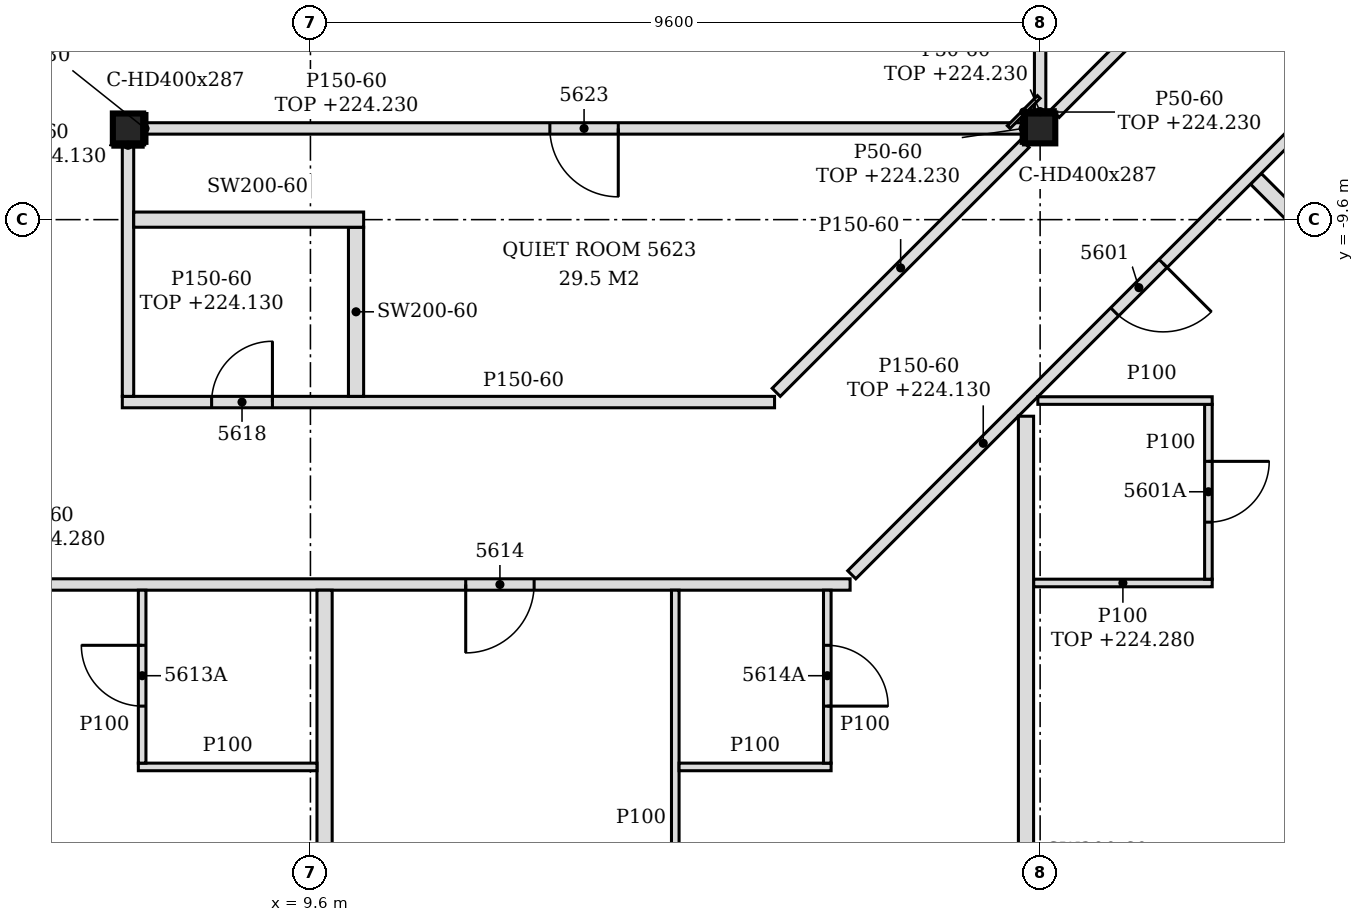
"""IFC4 building model, lengths in metres.
Left out: names, types, materials, properties, quantities, classifications, styles, units other than length and angle.
Written with IfcOpenShell. Run it as: python <this file> out.ifc"""

import sys

from ifc_helpers import new_model, si_unit, direction, frame, frame_2d, origin, origin_2d, place, context, subcontext, project, spatial, polyline, rectangle, i_section, outline, extrude, element, fill, save


model = new_model("IFC4")
c1 = context("Model", 3, precision=1e-05, world=origin(), true_north=direction((0.0, 1.0)))
c2 = subcontext(c1, "Body", "Model", "MODEL_VIEW")
j1 = project(units=[si_unit("LENGTHUNIT", "METRE"), si_unit("PLANEANGLEUNIT", "RADIAN")], contexts=[c1])
p1 = place(None, origin())
s1 = spatial("IfcSite", under=j1, at=p1, CompositionType="ELEMENT")
p2 = place(p1, origin())
s2 = spatial("IfcBuilding", under=s1, at=p2, CompositionType="ELEMENT")
p3 = place(p2, frame((0.0, 0.0, 221.4)))
s3 = spatial("IfcBuildingStorey", under=s2, at=p3, CompositionType="ELEMENT", Elevation=221.4)
for number, where, z_axis, x_axis in (
    (1, (7.2, -8.4, -0.15), (0.0, 0.0, 1.0), (1.0, 0.0, 0.0)),
    (2, (19.2, -8.4, -0.15), (0.0, 0.0, 1.0), (1.0, 0.0, 0.0)),
):
    element("IfcColumn", number, at=place(p3, frame(where, z_axis=z_axis, x_axis=x_axis)), inside=s3, PredefinedType="COLUMN", context=c2, shape_type="SweptSolid", body=[
        extrude(i_section(OverallWidth=0.399, OverallDepth=0.393, WebThickness=0.023, FlangeThickness=0.037, FilletRadius=0.015, at=origin_2d()), origin(), (0.0, 0.0, 1.0), 3.6),
    ])
p4 = place(p3, frame((9.786, -23.62, 0.0), z_axis=(0.0, 0.0, 1.0), x_axis=(0.0, 1.0, 0.0)))
e3 = element("IfcWall", 3, at=p4, inside=s3, PredefinedType="PARTITIONING", context=c2, shape_type="SweptSolid", body=[
    extrude(outline(polyline([(0.0, 0.0), (9.145, 0.0), (9.145, 2.88), (9.115, 2.88), (9.113, 3.45), (4.525, 3.45), (4.523, 2.88), (4.315, 2.88), (4.313, 3.45), (0.67, 3.45), (0.668, 2.93), (0.37, 2.93), (0.368, 3.45), (0.0, 3.45), (0.0, 0.0)])), frame((0.0, 0.1, 0.0), z_axis=(0.0, -1.0, 0.0), x_axis=(1.0, 0.0, 0.0)), (0.0, 0.0, 1.0), 0.2),
])
p5 = place(p3, frame((19.014, -23.62, 0.0), z_axis=(0.0, 0.0, 1.0), x_axis=(0.0, 1.0, 0.0)))
e4 = element("IfcWall", 4, at=p5, inside=s3, PredefinedType="PARTITIONING", context=c2, shape_type="SweptSolid", body=[
    extrude(outline(polyline([(0.0, 0.0), (11.434, 0.0), (11.434, 2.73), (0.64, 2.73), (0.638, 2.93), (0.37, 2.93), (0.368, 3.45), (0.0, 3.45), (0.0, 0.0)])), frame((0.0, 0.1, 0.0), z_axis=(0.0, -1.0, 0.0), x_axis=(1.0, 0.0, 0.0)), (0.0, 0.0, 1.0), 0.2),
])
p6 = place(p3, frame((14.4, -22.877, 0.0), z_axis=(0.0, 0.0, 1.0), x_axis=(0.0, 1.0, 0.0)))
e5 = element("IfcWall", 5, at=p6, inside=s3, PredefinedType="PARTITIONING", context=c2, shape_type="SweptSolid", body=[
    extrude(outline(polyline([(0.0, 0.0), (8.402, 0.0), (8.402, 2.88), (8.372, 2.88), (8.37, 3.45), (3.782, 3.45), (3.78, 2.88), (3.572, 2.88), (3.57, 3.45), (0.0, 3.45), (0.0, 0.0)])), frame((0.0, 0.05, 0.0), z_axis=(0.0, -1.0, 0.0), x_axis=(1.0, 0.0, 0.0)), (0.0, 0.0, 1.0), 0.1),
])
p7 = place(p6, frame((2.027, 0.0, 0.0)))
e6 = element("IfcOpeningElement", 6, at=p7, cuts=e5, PredefinedType="OPENING", context=c2, shape_type="SweptSolid", body=[
    extrude(rectangle(XDim=0.9, YDim=2.1, at=frame_2d((0.45, 1.05))), frame((0.0, 0.06, 0.0), z_axis=(0.0, -1.0, 0.0), x_axis=(1.0, 0.0, 0.0)), (0.0, 0.0, 1.0), 0.12),
])
p8 = place(p3, frame((7.336, -16.8, 0.0), z_axis=(0.0, 0.0, 1.0), x_axis=(1.0, 0.0, 0.0)))
e7 = element("IfcWall", 7, at=p8, inside=s3, PredefinedType="PARTITIONING", context=c2, shape_type="SweptSolid", body=[
    extrude(outline(polyline([(0.0, 0.0), (2.35, 0.0), (2.35, 3.45), (0.014, 3.45), (0.012, 2.73), (0.0, 2.73), (0.0, 0.0)])), frame((0.0, 0.05, 0.0), z_axis=(0.0, -1.0, 0.0), x_axis=(1.0, 0.0, 0.0)), (0.0, 0.0, 1.0), 0.1),
])
p9 = place(p3, frame((7.386, -16.75, 0.0), z_axis=(0.0, 0.0, 1.0), x_axis=(0.0, 1.0, 0.0)))
e8 = element("IfcWall", 8, at=p9, inside=s3, PredefinedType="PARTITIONING", context=c2, shape_type="SweptSolid", body=[
    extrude(outline(polyline([(0.0, 0.0), (2.275, 0.0), (2.275, 2.88), (2.245, 2.88), (2.243, 3.45), (0.0, 3.45), (0.0, 0.0)])), frame((0.0, 0.05, 0.0), z_axis=(0.0, -1.0, 0.0), x_axis=(1.0, 0.0, 0.0)), (0.0, 0.0, 1.0), 0.1),
])
p10 = place(p9, frame((0.75, 0.0, 0.0)))
e9 = element("IfcOpeningElement", 9, at=p10, cuts=e8, PredefinedType="OPENING", context=c2, shape_type="SweptSolid", body=[
    extrude(rectangle(XDim=0.8, YDim=2.1, at=frame_2d((0.4, 1.05))), frame((0.0, 0.06, 0.0), z_axis=(0.0, -1.0, 0.0), x_axis=(1.0, 0.0, 0.0)), (0.0, 0.0, 1.0), 0.12),
])
p11 = place(p3, frame((14.45, -16.8, 0.0), z_axis=(0.0, 0.0, 1.0), x_axis=(1.0, 0.0, 0.0)))
e10 = element("IfcWall", 10, at=p11, inside=s3, PredefinedType="PARTITIONING", context=c2, shape_type="SweptSolid", body=[
    extrude(rectangle(XDim=2.0, YDim=0.1, at=frame_2d((1.0, 0.0))), origin(), (0.0, 0.0, 1.0), 3.45),
])
p12 = place(p3, frame((16.4, -16.75, 0.0), z_axis=(0.0, 0.0, 1.0), x_axis=(0.0, 1.0, 0.0)))
e11 = element("IfcWall", 11, at=p12, inside=s3, PredefinedType="PARTITIONING", context=c2, shape_type="SweptSolid", body=[
    extrude(outline(polyline([(0.0, 0.0), (2.275, 0.0), (2.275, 2.88), (2.245, 2.88), (2.243, 3.45), (0.0, 3.45), (0.0, 0.0)])), frame((0.0, 0.05, 0.0), z_axis=(0.0, -1.0, 0.0), x_axis=(1.0, 0.0, 0.0)), (0.0, 0.0, 1.0), 0.1),
])
p13 = place(p12, frame((0.75, 0.0, 0.0)))
e12 = element("IfcOpeningElement", 12, at=p13, cuts=e11, PredefinedType="OPENING", context=c2, shape_type="SweptSolid", body=[
    extrude(rectangle(XDim=0.8, YDim=2.1, at=frame_2d((0.4, 1.05))), frame((0.0, 0.06, 0.0), z_axis=(0.0, -1.0, 0.0), x_axis=(1.0, 0.0, 0.0)), (0.0, 0.0, 1.0), 0.12),
])
p14 = place(p3, frame((29.636, -16.66, 0.0), z_axis=(0.0, 0.0, 1.0), x_axis=(-0.707095420673, 0.707118141518, 0.0)))
e13 = element("IfcWall", 13, at=p14, inside=s3, PredefinedType="PARTITIONING", context=c2, shape_type="SweptSolid", body=[
    extrude(rectangle(XDim=10.745, YDim=0.2, at=frame_2d((5.373, 0.0))), origin(), (0.0, 0.0, 1.0), 2.88),
])
p15 = place(p3, frame((-4.326, -14.4, 0.0), z_axis=(0.0, 0.0, 1.0), x_axis=(1.0, 0.0, 0.0)))
e14 = element("IfcWall", 14, at=p15, inside=s3, PredefinedType="PARTITIONING", context=c2, shape_type="SweptSolid", body=[
    extrude(outline(polyline([(0.0, 0.0), (21.026, 0.0), (21.026, 2.88), (11.676, 2.88), (11.674, 2.73), (11.376, 2.73), (11.374, 2.88), (1.369, 2.88), (1.367, 2.63), (0.229, 2.63), (0.227, 2.88), (0.0, 2.88), (0.0, 0.0)])), frame((0.0, 0.075, 0.0), z_axis=(0.0, -1.0, 0.0), x_axis=(1.0, 0.0, 0.0)), (0.0, 0.0, 1.0), 0.15),
])
p16 = place(p15, frame((5.169, 0.0, 0.0)))
e15 = element("IfcOpeningElement", 15, at=p16, cuts=e14, PredefinedType="OPENING", context=c2, shape_type="SweptSolid", body=[
    extrude(rectangle(XDim=0.9, YDim=2.1, at=frame_2d((0.45, 1.05))), frame((0.0, 0.085, 0.0), z_axis=(0.0, -1.0, 0.0), x_axis=(1.0, 0.0, 0.0)), (0.0, 0.0, 1.0), 0.17),
])
p17 = place(p15, frame((15.969, 0.0, 0.0)))
e16 = element("IfcOpeningElement", 16, at=p17, cuts=e14, PredefinedType="OPENING", context=c2, shape_type="SweptSolid", body=[
    extrude(rectangle(XDim=0.9, YDim=2.1, at=frame_2d((0.45, 1.05))), frame((0.0, 0.085, 0.0), z_axis=(0.0, -1.0, 0.0), x_axis=(1.0, 0.0, 0.0)), (0.0, 0.0, 1.0), 0.17),
])
p18 = place(p3, frame((19.114, -14.38, 0.0), z_axis=(0.0, 0.0, 1.0), x_axis=(1.0, 0.0, 0.0)))
e17 = element("IfcWall", 17, at=p18, inside=s3, PredefinedType="PARTITIONING", context=c2, shape_type="SweptSolid", body=[
    extrude(outline(polyline([(0.0, 0.0), (2.35, 0.0), (2.35, 2.88), (0.236, 2.88), (0.234, 2.73), (0.0, 2.73), (0.0, 0.0)])), frame((0.0, 0.05, 0.0), z_axis=(0.0, -1.0, 0.0), x_axis=(1.0, 0.0, 0.0)), (0.0, 0.0, 1.0), 0.1),
])
p19 = place(p3, frame((16.722, -14.272, 0.0), z_axis=(0.0, 0.0, 1.0), x_axis=(0.707106781187, 0.707106781187, 0.0)))
e18 = element("IfcWall", 18, at=p19, inside=s3, PredefinedType="PARTITIONING", context=c2, shape_type="SweptSolid", body=[
    extrude(rectangle(XDim=20.049, YDim=0.15, at=frame_2d((10.025, 0.0))), origin(), (0.0, 0.0, 1.0), 2.73),
])
p20 = place(p19, frame((4.892, 0.0, 0.0)))
e19 = element("IfcOpeningElement", 19, at=p20, cuts=e18, PredefinedType="OPENING", context=c2, shape_type="SweptSolid", body=[
    extrude(rectangle(XDim=0.9, YDim=2.1, at=frame_2d((0.45, 1.05))), frame((0.0, 0.085, 0.0), z_axis=(0.0, -1.0, 0.0), x_axis=(1.0, 0.0, 0.0)), (0.0, 0.0, 1.0), 0.17),
])
p21 = place(p19, frame((10.042, 0.0, 0.0)))
e20 = element("IfcOpeningElement", 20, at=p21, cuts=e18, PredefinedType="OPENING", context=c2, shape_type="SweptSolid", body=[
    extrude(rectangle(XDim=0.9, YDim=2.1, at=frame_2d((0.45, 1.05))), frame((0.0, 0.085, 0.0), z_axis=(0.0, -1.0, 0.0), x_axis=(1.0, 0.0, 0.0)), (0.0, 0.0, 1.0), 0.17),
])
p22 = place(p19, frame((14.443, 0.0, 0.0)))
e21 = element("IfcOpeningElement", 21, at=p22, cuts=e18, PredefinedType="OPENING", context=c2, shape_type="SweptSolid", body=[
    extrude(rectangle(XDim=0.9, YDim=2.1, at=frame_2d((0.45, 1.05))), frame((0.0, 0.085, 0.0), z_axis=(0.0, -1.0, 0.0), x_axis=(1.0, 0.0, 0.0)), (0.0, 0.0, 1.0), 0.17),
])
p23 = place(p19, frame((17.837, 0.0, 0.0)))
e22 = element("IfcOpeningElement", 22, at=p23, cuts=e18, PredefinedType="OPENING", context=c2, shape_type="SweptSolid", body=[
    extrude(rectangle(XDim=0.9, YDim=2.1, at=frame_2d((0.45, 1.05))), frame((0.0, 0.085, 0.0), z_axis=(0.0, -1.0, 0.0), x_axis=(1.0, 0.0, 0.0)), (0.0, 0.0, 1.0), 0.17),
])
p24 = place(p3, frame((21.414, -14.33, 0.0), z_axis=(0.0, 0.0, 1.0), x_axis=(0.0, 1.0, 0.0)))
e23 = element("IfcWall", 23, at=p24, inside=s3, PredefinedType="PARTITIONING", context=c2, shape_type="SweptSolid", body=[
    extrude(outline(polyline([(0.0, 0.0), (2.3, 0.0), (2.3, 3.45), (0.035, 3.45), (0.033, 2.88), (0.0, 2.88), (0.0, 0.0)])), frame((0.0, 0.05, 0.0), z_axis=(0.0, -1.0, 0.0), x_axis=(1.0, 0.0, 0.0)), (0.0, 0.0, 1.0), 0.1),
])
p25 = place(p24, frame((0.75, 0.0, 0.0)))
e24 = element("IfcOpeningElement", 24, at=p25, cuts=e23, PredefinedType="OPENING", context=c2, shape_type="SweptSolid", body=[
    extrude(rectangle(XDim=0.8, YDim=2.1, at=frame_2d((0.4, 1.05))), frame((0.0, 0.06, 0.0), z_axis=(0.0, -1.0, 0.0), x_axis=(1.0, 0.0, 0.0)), (0.0, 0.0, 1.0), 0.12),
])
p26 = place(p3, frame((7.125, -12.0, 0.0), z_axis=(0.0, 0.0, 1.0), x_axis=(1.0, 0.0, 0.0)))
e25 = element("IfcWall", 25, at=p26, inside=s3, PredefinedType="PARTITIONING", context=c2, shape_type="SweptSolid", body=[
    extrude(outline(polyline([(0.0, 0.0), (8.581, 0.0), (8.581, 3.45), (0.225, 3.45), (0.223, 2.73), (0.0, 2.73), (0.0, 0.0)])), frame((0.0, 0.075, 0.0), z_axis=(0.0, -1.0, 0.0), x_axis=(1.0, 0.0, 0.0)), (0.0, 0.0, 1.0), 0.15),
])
p27 = place(p26, frame((1.175, 0.0, 0.0)))
e26 = element("IfcOpeningElement", 26, at=p27, cuts=e25, PredefinedType="OPENING", context=c2, shape_type="SweptSolid", body=[
    extrude(rectangle(XDim=0.8, YDim=2.1, at=frame_2d((0.4, 1.05))), frame((0.0, 0.085, 0.0), z_axis=(0.0, -1.0, 0.0), x_axis=(1.0, 0.0, 0.0)), (0.0, 0.0, 1.0), 0.17),
])
p28 = place(p3, frame((19.17, -11.98, 0.0), z_axis=(0.0, 0.0, 1.0), x_axis=(1.0, 0.0, 0.0)))
e27 = element("IfcWall", 27, at=p28, inside=s3, PredefinedType="PARTITIONING", context=c2, shape_type="SweptSolid", body=[
    extrude(outline(polyline([(0.0, 0.0), (2.294, 0.0), (2.294, 3.45), (0.18, 3.45), (0.178, 2.73), (0.0, 2.73), (0.0, 0.0)])), frame((0.0, 0.05, 0.0), z_axis=(0.0, -1.0, 0.0), x_axis=(1.0, 0.0, 0.0)), (0.0, 0.0, 1.0), 0.1),
])
p29 = place(p3, frame((7.2, -11.925, 0.0), z_axis=(0.0, 0.0, 1.0), x_axis=(0.0, 1.0, 0.0)))
e28 = element("IfcWall", 28, at=p29, inside=s3, PredefinedType="PARTITIONING", context=c2, shape_type="SweptSolid", body=[
    extrude(rectangle(XDim=3.329, YDim=0.15, at=frame_2d((1.664, 0.0))), origin(), (0.0, 0.0, 1.0), 2.73),
])
p30 = place(p3, frame((10.2, -11.925, 0.0), z_axis=(0.0, 0.0, 1.0), x_axis=(0.0, 1.0, 0.0)))
e29 = element("IfcWall", 29, at=p30, inside=s3, PredefinedType="PARTITIONING", context=c2, shape_type="SweptSolid", body=[
    extrude(rectangle(XDim=2.225, YDim=0.2, at=frame_2d((1.113, 0.0))), origin(), (0.0, 0.0, 1.0), 3.45),
])
p31 = place(p3, frame((15.728, -11.872, 0.0), z_axis=(0.0, 0.0, 1.0), x_axis=(0.707080416772, 0.707133144618, 0.0)))
e30 = element("IfcWall", 30, at=p31, inside=s3, PredefinedType="PARTITIONING", context=c2, shape_type="SweptSolid", body=[
    extrude(rectangle(XDim=4.63, YDim=0.15, at=frame_2d((2.315, 0.0))), origin(), (0.0, 0.0, 1.0), 3.45),
])
p32 = place(p3, frame((7.275, -9.6, 0.0), z_axis=(0.0, 0.0, 1.0), x_axis=(1.0, 0.0, 0.0)))
e31 = element("IfcWall", 31, at=p32, inside=s3, PredefinedType="PARTITIONING", context=c2, shape_type="SweptSolid", body=[
    extrude(outline(polyline([(0.0, 0.0), (3.025, 0.0), (3.025, 3.45), (0.075, 3.45), (0.073, 2.73), (0.0, 2.73), (0.0, 0.0)])), frame((0.0, 0.1, 0.0), z_axis=(0.0, -1.0, 0.0), x_axis=(1.0, 0.0, 0.0)), (0.0, 0.0, 1.0), 0.2),
])
p33 = place(p3, frame((7.399, -8.4, 0.0), z_axis=(0.0, 0.0, 1.0), x_axis=(1.0, 0.0, 0.0)))
e32 = element("IfcWall", 32, at=p33, inside=s3, PredefinedType="PARTITIONING", context=c2, shape_type="SweptSolid", body=[
    extrude(rectangle(XDim=11.601, YDim=0.15, at=frame_2d((5.801, 0.0))), origin(), (0.0, 0.0, 1.0), 2.83),
])
p34 = place(p33, frame((5.351, 0.0, 0.0)))
e33 = element("IfcOpeningElement", 33, at=p34, cuts=e32, PredefinedType="OPENING", context=c2, shape_type="SweptSolid", body=[
    extrude(rectangle(XDim=0.9, YDim=2.1, at=frame_2d((0.45, 1.05))), frame((0.0, 0.085, 0.0), z_axis=(0.0, -1.0, 0.0), x_axis=(1.0, 0.0, 0.0)), (0.0, 0.0, 1.0), 0.17),
])
p35 = place(p3, frame((19.2, -8.204, 0.0), z_axis=(0.0, 0.0, 1.0), x_axis=(0.0, 1.0, 0.0)))
e34 = element("IfcWall", 34, at=p35, inside=s3, PredefinedType="PARTITIONING", context=c2, shape_type="SweptSolid", body=[
    extrude(rectangle(XDim=9.329, YDim=0.15, at=frame_2d((4.664, 0.0))), origin(), (0.0, 0.0, 1.0), 2.83),
])
p36 = place(p35, frame((7.354, 0.0, 0.0)))
e35 = element("IfcOpeningElement", 35, at=p36, cuts=e34, PredefinedType="OPENING", context=c2, shape_type="SweptSolid", body=[
    extrude(rectangle(XDim=0.8, YDim=2.1, at=frame_2d((0.4, 1.05))), frame((0.0, 0.085, 0.0), z_axis=(0.0, -1.0, 0.0), x_axis=(1.0, 0.0, 0.0)), (0.0, 0.0, 1.0), 0.17),
])
p37 = place(p35, frame((4.503, 0.0, 0.0)))
e36 = element("IfcOpeningElement", 36, at=p37, cuts=e34, PredefinedType="OPENING", context=c2, shape_type="SweptSolid", body=[
    extrude(rectangle(XDim=0.8, YDim=2.1, at=frame_2d((0.4, 1.05))), frame((0.0, 0.085, 0.0), z_axis=(0.0, -1.0, 0.0), x_axis=(1.0, 0.0, 0.0)), (0.0, 0.0, 1.0), 0.17),
])
p38 = place(p3, frame((19.398, -8.202, 0.0), z_axis=(0.0, 0.0, 1.0), x_axis=(0.707116088468, 0.707097473782, 0.0)))
e37 = element("IfcWall", 37, at=p38, inside=s3, PredefinedType="PARTITIONING", context=c2, shape_type="SweptSolid", body=[
    extrude(rectangle(XDim=13.115, YDim=0.15, at=frame_2d((6.558, 0.0))), origin(), (0.0, 0.0, 1.0), 2.88),
])
p39 = place(p38, frame((6.058, 0.0, 0.0)))
e38 = element("IfcOpeningElement", 38, at=p39, cuts=e37, PredefinedType="OPENING", context=c2, shape_type="SweptSolid", body=[
    extrude(rectangle(XDim=0.9, YDim=2.1, at=frame_2d((0.45, 1.05))), frame((0.0, 0.085, 0.0), z_axis=(0.0, -1.0, 0.0), x_axis=(1.0, 0.0, 0.0)), (0.0, 0.0, 1.0), 0.17),
])
p40 = place(p3, frame((7.425, -8.596, 0.0), z_axis=(0.0, 0.0, 1.0), x_axis=(0.0, 1.0, 0.0)))
e39 = element("IfcWall", 39, at=p40, inside=s3, PredefinedType="PARTITIONING", context=c2, shape_type="SweptSolid", body=[
    extrude(rectangle(XDim=0.393, YDim=0.05, at=frame_2d((0.196, 0.0))), origin(), (0.0, 0.0, 1.0), 2.83),
])
p41 = place(p3, frame((18.786, -8.382, 0.0), z_axis=(0.0, 0.0, 1.0), x_axis=(0.707106781187, 0.707106781187, 0.0)))
e40 = element("IfcWall", 40, at=p41, inside=s3, PredefinedType="PARTITIONING", context=c2, shape_type="SweptSolid", body=[
    extrude(rectangle(XDim=0.56, YDim=0.05, at=frame_2d((0.28, 0.0))), origin(), (0.0, 0.0, 1.0), 2.83),
])
p42 = place(p3, frame((7.0, -8.622, 0.0), z_axis=(0.0, 0.0, 1.0), x_axis=(1.0, 0.0, 0.0)))
e41 = element("IfcWall", 41, at=p42, inside=s3, PredefinedType="PARTITIONING", context=c2, shape_type="SweptSolid", body=[
    extrude(rectangle(XDim=0.399, YDim=0.05, at=frame_2d((0.199, 0.0))), origin(), (0.0, 0.0, 1.0), 2.73),
])
p43 = place(p3, frame((19.0, -8.178, 0.0), z_axis=(0.0, 0.0, 1.0), x_axis=(1.0, 0.0, 0.0)))
e42 = element("IfcWall", 42, at=p43, inside=s3, PredefinedType="PARTITIONING", context=c2, shape_type="SweptSolid", body=[
    extrude(rectangle(XDim=0.399, YDim=0.05, at=frame_2d((0.199, 0.0))), origin(), (0.0, 0.0, 1.0), 2.83),
])
p44 = place(p3, frame((18.976, -8.596, 0.0), z_axis=(0.0, 0.0, 1.0), x_axis=(0.0, 1.0, 0.0)))
e43 = element("IfcWall", 43, at=p44, inside=s3, PredefinedType="PARTITIONING", context=c2, shape_type="SweptSolid", body=[
    extrude(rectangle(XDim=0.393, YDim=0.05, at=frame_2d((0.196, 0.0))), origin(), (0.0, 0.0, 1.0), 2.83),
])
p45 = place(p20, frame((0.9, 0.0, 0.0), z_axis=(0.0, 0.0, 1.0), x_axis=(-1.0, 0.0, 0.0)))
e44 = element("IfcDoor", 44, at=p45, inside=s3, OperationType="SINGLE_SWING_LEFT", PredefinedType="DOOR", context=c2, shape_type="SweptSolid", body=[
    extrude(rectangle(XDim=0.9, YDim=2.1, at=frame_2d((0.45, 1.05))), frame((0.0, 0.025, 0.0), z_axis=(0.0, -1.0, 0.0), x_axis=(1.0, 0.0, 0.0)), (0.0, 0.0, 1.0), 0.05),
])
fill(e19, e44)
p46 = place(p25, frame((0.8, 0.0, 0.0), z_axis=(0.0, 0.0, 1.0), x_axis=(-1.0, 0.0, 0.0)))
e45 = element("IfcDoor", 45, at=p46, inside=s3, OperationType="SINGLE_SWING_LEFT", PredefinedType="DOOR", context=c2, shape_type="SweptSolid", body=[
    extrude(rectangle(XDim=0.8, YDim=2.1, at=frame_2d((0.4, 1.05))), frame((0.0, 0.025, 0.0), z_axis=(0.0, -1.0, 0.0), x_axis=(1.0, 0.0, 0.0)), (0.0, 0.0, 1.0), 0.05),
])
fill(e24, e45)
p47 = place(p10, origin())
e46 = element("IfcDoor", 46, at=p47, inside=s3, OperationType="SINGLE_SWING_RIGHT", PredefinedType="DOOR", context=c2, shape_type="SweptSolid", body=[
    extrude(rectangle(XDim=0.8, YDim=2.1, at=frame_2d((0.4, 1.05))), frame((0.0, 0.025, 0.0), z_axis=(0.0, -1.0, 0.0), x_axis=(1.0, 0.0, 0.0)), (0.0, 0.0, 1.0), 0.05),
])
fill(e9, e46)
p48 = place(p17, frame((0.9, 0.0, 0.0), z_axis=(0.0, 0.0, 1.0), x_axis=(-1.0, 0.0, 0.0)))
e47 = element("IfcDoor", 47, at=p48, inside=s3, OperationType="SINGLE_SWING_RIGHT", PredefinedType="DOOR", context=c2, shape_type="SweptSolid", body=[
    extrude(rectangle(XDim=0.9, YDim=2.1, at=frame_2d((0.45, 1.05))), frame((0.0, 0.025, 0.0), z_axis=(0.0, -1.0, 0.0), x_axis=(1.0, 0.0, 0.0)), (0.0, 0.0, 1.0), 0.05),
])
fill(e16, e47)
p49 = place(p13, frame((0.8, 0.0, 0.0), z_axis=(0.0, 0.0, 1.0), x_axis=(-1.0, 0.0, 0.0)))
e48 = element("IfcDoor", 48, at=p49, inside=s3, OperationType="SINGLE_SWING_RIGHT", PredefinedType="DOOR", context=c2, shape_type="SweptSolid", body=[
    extrude(rectangle(XDim=0.8, YDim=2.1, at=frame_2d((0.4, 1.05))), frame((0.0, 0.025, 0.0), z_axis=(0.0, -1.0, 0.0), x_axis=(1.0, 0.0, 0.0)), (0.0, 0.0, 1.0), 0.05),
])
fill(e12, e48)
p50 = place(p27, origin())
e49 = element("IfcDoor", 49, at=p50, inside=s3, OperationType="SINGLE_SWING_RIGHT", PredefinedType="DOOR", context=c2, shape_type="SweptSolid", body=[
    extrude(rectangle(XDim=0.8, YDim=2.1, at=frame_2d((0.4, 1.05))), frame((0.0, 0.025, 0.0), z_axis=(0.0, -1.0, 0.0), x_axis=(1.0, 0.0, 0.0)), (0.0, 0.0, 1.0), 0.05),
])
fill(e26, e49)
p51 = place(p34, frame((0.9, 0.0, 0.0), z_axis=(0.0, 0.0, 1.0), x_axis=(-1.0, 0.0, 0.0)))
e50 = element("IfcDoor", 50, at=p51, inside=s3, OperationType="SINGLE_SWING_LEFT", PredefinedType="DOOR", context=c2, shape_type="SweptSolid", body=[
    extrude(rectangle(XDim=0.9, YDim=2.1, at=frame_2d((0.45, 1.05))), frame((0.0, 0.025, 0.0), z_axis=(0.0, -1.0, 0.0), x_axis=(1.0, 0.0, 0.0)), (0.0, 0.0, 1.0), 0.05),
])
fill(e33, e50)
save(model, sys.argv[1])
